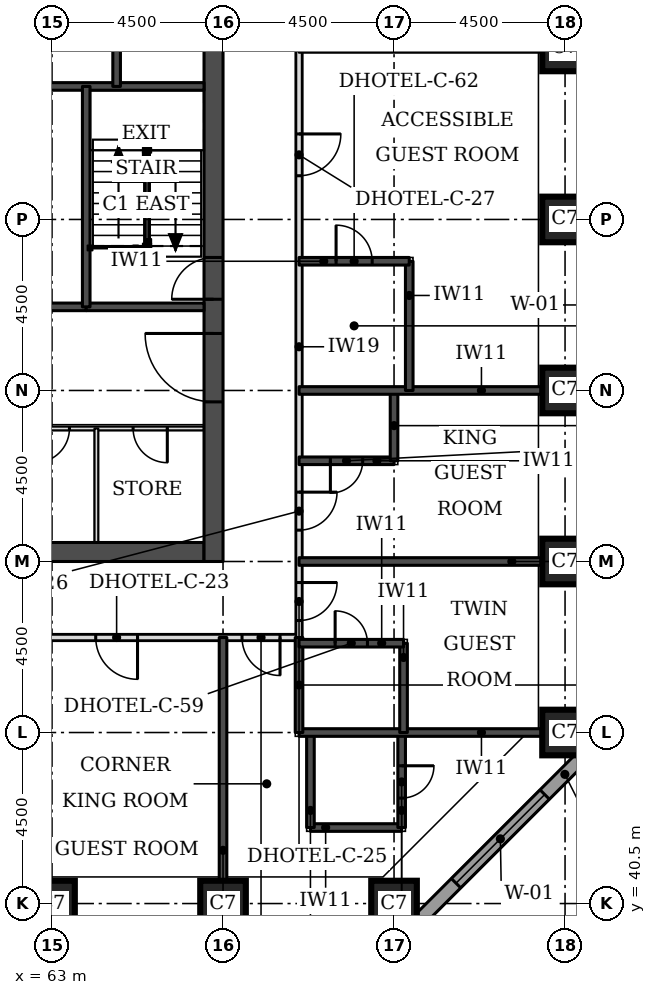
"""IFC4 building model, lengths in metres.
Left out: names, types, materials, properties, quantities, classifications, styles, units other than length and angle.
Written with IfcOpenShell. Run it as: python <this file> out.ifc"""

import sys

from ifc_helpers import new_model, si_unit, direction, frame, frame_2d, origin, origin_2d, place, context, subcontext, project, spatial, rectangle, extrude, element, fill, save


model = new_model("IFC4")
c1 = context("Model", 3, precision=1e-05, world=origin(), true_north=direction((0.0, 1.0)))
c2 = subcontext(c1, "Body", "Model", "MODEL_VIEW")
j1 = project(units=[si_unit("LENGTHUNIT", "METRE"), si_unit("PLANEANGLEUNIT", "RADIAN")], contexts=[c1])
p1 = place(None, origin())
s1 = spatial("IfcSite", under=j1, at=p1, CompositionType="ELEMENT")
p2 = place(p1, origin())
s2 = spatial("IfcBuilding", under=s1, at=p2, CompositionType="ELEMENT")
p3 = place(p2, frame((0.0, 0.0, 56.1)))
s3 = spatial("IfcBuildingStorey", under=s2, at=p3, CompositionType="ELEMENT", Elevation=56.1)
for number, where, z_axis, x_axis in (
    (1, (63.0, 40.5, 0.0), (0.0, 0.0, 1.0), (1.0, 0.0, 0.0)),
    (2, (67.5, 40.5, 0.0), (0.0, 0.0, 1.0), (1.0, 0.0, 0.0)),
    (3, (72.0, 40.5, 0.0), (0.0, 0.0, 1.0), (1.0, 0.0, 0.0)),
    (4, (76.5, 45.0, 0.0), (0.0, 0.0, 1.0), (1.0, 0.0, 0.0)),
    (5, (76.5, 49.5, 0.0), (0.0, 0.0, 1.0), (1.0, 0.0, 0.0)),
    (6, (76.5, 54.0, 0.0), (0.0, 0.0, 1.0), (1.0, 0.0, 0.0)),
    (7, (76.5, 58.5, 0.0), (0.0, 0.0, 1.0), (1.0, 0.0, 0.0)),
    (8, (76.5, 63.0, 0.0), (0.0, 0.0, 1.0), (1.0, 0.0, 0.0)),
):
    element("IfcColumn", number, at=place(p3, frame(where, z_axis=z_axis, x_axis=x_axis)), inside=s3, PredefinedType="COLUMN", context=c2, shape_type="SweptSolid", body=[
        extrude(rectangle(XDim=1.2, YDim=1.2, at=origin_2d()), origin(), (0.0, 0.0, 1.0), 3.3),
    ])
p4 = place(p3, frame((45.5, 49.75, 0.0), z_axis=(0.0, 0.0, 1.0), x_axis=(1.0, 0.0, 0.0)))
e9 = element("IfcWall", 9, at=p4, inside=s3, PredefinedType="SHEAR", context=c2, shape_type="SweptSolid", body=[
    extrude(rectangle(XDim=21.5, YDim=0.5, at=frame_2d((10.75, 0.0))), origin(), (0.0, 0.0, 1.0), 3.3),
])
p5 = place(p3, frame((67.25, 49.5, 0.0), z_axis=(0.0, 0.0, 1.0), x_axis=(0.0, 1.0, 0.0)))
e10 = element("IfcWall", 10, at=p5, inside=s3, PredefinedType="SHEAR", context=c2, shape_type="SweptSolid", body=[
    extrude(rectangle(XDim=22.5, YDim=0.5, at=frame_2d((11.25, 0.0))), origin(), (0.0, 0.0, 1.0), 3.3),
])
p6 = place(p5, frame((4.2, 0.0, 0.0)))
e11 = element("IfcOpeningElement", 11, at=p6, cuts=e10, PredefinedType="OPENING", context=c2, shape_type="SweptSolid", body=[
    extrude(rectangle(XDim=1.8, YDim=2.1, at=frame_2d((0.9, 1.05))), frame((0.0, 0.26, 0.0), z_axis=(0.0, -1.0, 0.0), x_axis=(1.0, 0.0, 0.0)), (0.0, 0.0, 1.0), 0.52),
])
p7 = place(p5, frame((6.9, 0.0, 0.0)))
e12 = element("IfcOpeningElement", 12, at=p7, cuts=e10, PredefinedType="OPENING", context=c2, shape_type="SweptSolid", body=[
    extrude(rectangle(XDim=1.1, YDim=2.1, at=frame_2d((0.55, 1.05))), frame((0.0, 0.26, 0.0), z_axis=(0.0, -1.0, 0.0), x_axis=(1.0, 0.0, 0.0)), (0.0, 0.0, 1.0), 0.52),
])
p8 = place(p5, frame((13.6, 0.0, 0.0)))
e13 = element("IfcOpeningElement", 13, at=p8, cuts=e10, PredefinedType="OPENING", context=c2, shape_type="SweptSolid", body=[
    extrude(rectangle(XDim=1.1, YDim=2.1, at=frame_2d((0.55, 1.05))), frame((0.0, 0.26, 0.0), z_axis=(0.0, -1.0, 0.0), x_axis=(1.0, 0.0, 0.0)), (0.0, 0.0, 1.0), 0.52),
])
p9 = place(p5, frame((16.5, 0.0, 0.0)))
e14 = element("IfcOpeningElement", 14, at=p9, cuts=e10, PredefinedType="OPENING", context=c2, shape_type="SweptSolid", body=[
    extrude(rectangle(XDim=1.8, YDim=2.1, at=frame_2d((0.9, 1.05))), frame((0.0, 0.26, 0.0), z_axis=(0.0, -1.0, 0.0), x_axis=(1.0, 0.0, 0.0)), (0.0, 0.0, 1.0), 0.52),
])
p10 = place(p3, frame((72.27, 39.674, 0.0), z_axis=(0.0, 0.0, 1.0), x_axis=(0.707106781187, 0.707106781187, 0.0)))
e15 = element("IfcWall", 15, at=p10, inside=s3, PredefinedType="STANDARD", context=c2, shape_type="SweptSolid", body=[
    extrude(rectangle(XDim=7.151, YDim=0.35, at=frame_2d((3.576, 0.0))), origin(), (0.0, 0.0, 1.0), 3.055),
])
p11 = place(p10, frame((1.926, 0.0, 0.8)))
e16 = element("IfcOpeningElement", 16, at=p11, cuts=e15, PredefinedType="OPENING", context=c2, shape_type="SweptSolid", body=[
    extrude(rectangle(XDim=3.3, YDim=1.5, at=frame_2d((1.65, 0.75))), frame((0.0, 0.185, 0.0), z_axis=(0.0, -1.0, 0.0), x_axis=(1.0, 0.0, 0.0)), (0.0, 0.0, 1.0), 0.37),
])
p12 = place(p3, frame((52.85, 47.5, 0.0), z_axis=(0.0, 0.0, 1.0), x_axis=(1.0, 0.0, 0.0)))
e17 = element("IfcWall", 17, at=p12, inside=s3, PredefinedType="PARTITIONING", context=c2, shape_type="SweptSolid", body=[
    extrude(rectangle(XDim=16.65, YDim=0.15, at=frame_2d((8.325, 0.0))), origin(), (0.0, 0.0, 1.0), 3.08),
])
p13 = place(p12, frame((11.3, 0.0, 0.0)))
e18 = element("IfcOpeningElement", 18, at=p13, cuts=e17, PredefinedType="OPENING", context=c2, shape_type="SweptSolid", body=[
    extrude(rectangle(XDim=1.1, YDim=2.1, at=frame_2d((0.55, 1.05))), frame((0.0, 0.085, 0.0), z_axis=(0.0, -1.0, 0.0), x_axis=(1.0, 0.0, 0.0)), (0.0, 0.0, 1.0), 0.17),
])
p14 = place(p12, frame((15.15, 0.0, 0.0)))
e19 = element("IfcOpeningElement", 19, at=p14, cuts=e17, PredefinedType="OPENING", context=c2, shape_type="SweptSolid", body=[
    extrude(rectangle(XDim=1.0, YDim=2.1, at=frame_2d((0.5, 1.05))), frame((0.0, 0.085, 0.0), z_axis=(0.0, -1.0, 0.0), x_axis=(1.0, 0.0, 0.0)), (0.0, 0.0, 1.0), 0.17),
])
p15 = place(p3, frame((69.5, 47.5, 0.0), z_axis=(0.0, 0.0, 1.0), x_axis=(0.0, 1.0, 0.0)))
e20 = element("IfcWall", 20, at=p15, inside=s3, PredefinedType="PARTITIONING", context=c2, shape_type="SweptSolid", body=[
    extrude(rectangle(XDim=26.5, YDim=0.15, at=frame_2d((13.25, 0.0))), origin(), (0.0, 0.0, 1.0), 3.08),
])
p16 = place(p15, frame((25.053, 0.0, 0.0)))
e21 = element("IfcOpeningElement", 21, at=p16, cuts=e20, PredefinedType="OPENING", context=c2, shape_type="SweptSolid", body=[
    extrude(rectangle(XDim=1.0, YDim=2.1, at=frame_2d((0.5, 1.05))), frame((0.0, 0.085, 0.0), z_axis=(0.0, -1.0, 0.0), x_axis=(1.0, 0.0, 0.0)), (0.0, 0.0, 1.0), 0.17),
])
p17 = place(p15, frame((18.275, 0.0, 0.0)))
e22 = element("IfcOpeningElement", 22, at=p17, cuts=e20, PredefinedType="OPENING", context=c2, shape_type="SweptSolid", body=[
    extrude(rectangle(XDim=1.0, YDim=2.1, at=frame_2d((0.5, 1.05))), frame((0.0, 0.085, 0.0), z_axis=(0.0, -1.0, 0.0), x_axis=(1.0, 0.0, 0.0)), (0.0, 0.0, 1.0), 0.17),
])
p18 = place(p15, frame((12.15, 0.0, 0.0)))
e23 = element("IfcOpeningElement", 23, at=p18, cuts=e20, PredefinedType="OPENING", context=c2, shape_type="SweptSolid", body=[
    extrude(rectangle(XDim=1.1, YDim=2.1, at=frame_2d((0.55, 1.05))), frame((0.0, 0.085, 0.0), z_axis=(0.0, -1.0, 0.0), x_axis=(1.0, 0.0, 0.0)), (0.0, 0.0, 1.0), 0.17),
])
p19 = place(p15, frame((2.825, 0.0, 0.0)))
e24 = element("IfcOpeningElement", 24, at=p19, cuts=e20, PredefinedType="OPENING", context=c2, shape_type="SweptSolid", body=[
    extrude(rectangle(XDim=1.0, YDim=2.1, at=frame_2d((0.5, 1.05))), frame((0.0, 0.085, 0.0), z_axis=(0.0, -1.0, 0.0), x_axis=(1.0, 0.0, 0.0)), (0.0, 0.0, 1.0), 0.17),
])
p20 = place(p15, frame((0.447, 0.0, 0.0)))
e25 = element("IfcOpeningElement", 25, at=p20, cuts=e20, PredefinedType="OPENING", context=c2, shape_type="SweptSolid", body=[
    extrude(rectangle(XDim=1.0, YDim=2.1, at=frame_2d((0.5, 1.05))), frame((0.0, 0.085, 0.0), z_axis=(0.0, -1.0, 0.0), x_axis=(1.0, 0.0, 0.0)), (0.0, 0.0, 1.0), 0.17),
])
p21 = place(p3, frame((67.5, 41.1, 0.0), z_axis=(0.0, 0.0, 1.0), x_axis=(0.0, 1.0, 0.0)))
e26 = element("IfcWall", 26, at=p21, inside=s3, PredefinedType="SOLIDWALL", context=c2, shape_type="SweptSolid", body=[
    extrude(rectangle(XDim=6.4, YDim=0.2, at=frame_2d((3.2, 0.0))), origin(), (0.0, 0.0, 1.0), 3.08),
])
p22 = place(p3, frame((69.8, 42.5, 0.0), z_axis=(0.0, 0.0, 1.0), x_axis=(1.0, 0.0, 0.0)))
e27 = element("IfcWall", 27, at=p22, inside=s3, PredefinedType="SOLIDWALL", context=c2, shape_type="SweptSolid", body=[
    extrude(rectangle(XDim=2.4, YDim=0.2, at=frame_2d((1.2, 0.0))), origin(), (0.0, 0.0, 1.0), 3.08),
])
p23 = place(p3, frame((69.8, 42.5, 0.0), z_axis=(0.0, 0.0, 1.0), x_axis=(0.0, 1.0, 0.0)))
e28 = element("IfcWall", 28, at=p23, inside=s3, PredefinedType="SOLIDWALL", context=c2, shape_type="SweptSolid", body=[
    extrude(rectangle(XDim=2.5, YDim=0.2, at=frame_2d((1.25, 0.0))), origin(), (0.0, 0.0, 1.0), 3.08),
])
p24 = place(p3, frame((72.2, 42.5, 0.0), z_axis=(0.0, 0.0, 1.0), x_axis=(0.0, 1.0, 0.0)))
e29 = element("IfcWall", 29, at=p24, inside=s3, PredefinedType="SOLIDWALL", context=c2, shape_type="SweptSolid", body=[
    extrude(rectangle(XDim=2.5, YDim=0.2, at=frame_2d((1.25, 0.0))), origin(), (0.0, 0.0, 1.0), 3.08),
])
p25 = place(p24, frame((0.775, 0.0, 0.0)))
e30 = element("IfcOpeningElement", 30, at=p25, cuts=e29, PredefinedType="OPENING", context=c2, shape_type="SweptSolid", body=[
    extrude(rectangle(XDim=0.85, YDim=2.1, at=frame_2d((0.425, 1.05))), frame((0.0, 0.11, 0.0), z_axis=(0.0, -1.0, 0.0), x_axis=(1.0, 0.0, 0.0)), (0.0, 0.0, 1.0), 0.22),
])
p26 = place(p3, frame((69.5, 45.0, 0.0), z_axis=(0.0, 0.0, 1.0), x_axis=(1.0, 0.0, 0.0)))
e31 = element("IfcWall", 31, at=p26, inside=s3, PredefinedType="SOLIDWALL", context=c2, shape_type="SweptSolid", body=[
    extrude(rectangle(XDim=6.4, YDim=0.2, at=frame_2d((3.2, 0.0))), origin(), (0.0, 0.0, 1.0), 3.08),
])
p27 = place(p3, frame((69.5, 45.0, 0.0), z_axis=(0.0, 0.0, 1.0), x_axis=(0.0, 1.0, 0.0)))
e32 = element("IfcWall", 32, at=p27, inside=s3, PredefinedType="SOLIDWALL", context=c2, shape_type="SweptSolid", body=[
    extrude(rectangle(XDim=2.5, YDim=0.2, at=frame_2d((1.25, 0.0))), origin(), (0.0, 0.0, 1.0), 3.08),
])
p28 = place(p3, frame((72.25, 45.0, 0.0), z_axis=(0.0, 0.0, 1.0), x_axis=(0.0, 1.0, 0.0)))
e33 = element("IfcWall", 33, at=p28, inside=s3, PredefinedType="SOLIDWALL", context=c2, shape_type="SweptSolid", body=[
    extrude(rectangle(XDim=2.35, YDim=0.2, at=frame_2d((1.175, 0.0))), origin(), (0.0, 0.0, 1.0), 3.08),
])
p29 = place(p3, frame((69.5, 47.35, 0.0), z_axis=(0.0, 0.0, 1.0), x_axis=(1.0, 0.0, 0.0)))
e34 = element("IfcWall", 34, at=p29, inside=s3, PredefinedType="SOLIDWALL", context=c2, shape_type="SweptSolid", body=[
    extrude(rectangle(XDim=2.75, YDim=0.2, at=frame_2d((1.375, 0.0))), origin(), (0.0, 0.0, 1.0), 3.08),
])
p30 = place(p29, frame((0.95, 0.0, 0.0)))
e35 = element("IfcOpeningElement", 35, at=p30, cuts=e34, PredefinedType="OPENING", context=c2, shape_type="SweptSolid", body=[
    extrude(rectangle(XDim=0.85, YDim=2.1, at=frame_2d((0.425, 1.05))), frame((0.0, 0.11, 0.0), z_axis=(0.0, -1.0, 0.0), x_axis=(1.0, 0.0, 0.0)), (0.0, 0.0, 1.0), 0.22),
])
p31 = place(p3, frame((69.5, 49.5, 0.0), z_axis=(0.0, 0.0, 1.0), x_axis=(1.0, 0.0, 0.0)))
e36 = element("IfcWall", 36, at=p31, inside=s3, PredefinedType="SOLIDWALL", context=c2, shape_type="SweptSolid", body=[
    extrude(rectangle(XDim=6.4, YDim=0.2, at=frame_2d((3.2, 0.0))), origin(), (0.0, 0.0, 1.0), 3.08),
])
p32 = place(p3, frame((69.5, 52.15, 0.0), z_axis=(0.0, 0.0, 1.0), x_axis=(1.0, 0.0, 0.0)))
e37 = element("IfcWall", 37, at=p32, inside=s3, PredefinedType="SOLIDWALL", context=c2, shape_type="SweptSolid", body=[
    extrude(rectangle(XDim=2.5, YDim=0.2, at=frame_2d((1.25, 0.0))), origin(), (0.0, 0.0, 1.0), 3.08),
])
p33 = place(p32, frame((0.825, 0.0, 0.0)))
e38 = element("IfcOpeningElement", 38, at=p33, cuts=e37, PredefinedType="OPENING", context=c2, shape_type="SweptSolid", body=[
    extrude(rectangle(XDim=0.85, YDim=2.1, at=frame_2d((0.425, 1.05))), frame((0.0, 0.11, 0.0), z_axis=(0.0, -1.0, 0.0), x_axis=(1.0, 0.0, 0.0)), (0.0, 0.0, 1.0), 0.22),
])
p34 = place(p3, frame((72.0, 52.15, 0.0), z_axis=(0.0, 0.0, 1.0), x_axis=(0.0, 1.0, 0.0)))
e39 = element("IfcWall", 39, at=p34, inside=s3, PredefinedType="SOLIDWALL", context=c2, shape_type="SweptSolid", body=[
    extrude(rectangle(XDim=1.85, YDim=0.2, at=frame_2d((0.925, 0.0))), origin(), (0.0, 0.0, 1.0), 3.08),
])
p35 = place(p3, frame((69.5, 54.0, 0.0), z_axis=(0.0, 0.0, 1.0), x_axis=(1.0, 0.0, 0.0)))
e40 = element("IfcWall", 40, at=p35, inside=s3, PredefinedType="SOLIDWALL", context=c2, shape_type="SweptSolid", body=[
    extrude(rectangle(XDim=6.4, YDim=0.2, at=frame_2d((3.2, 0.0))), origin(), (0.0, 0.0, 1.0), 3.08),
])
p36 = place(p3, frame((72.4, 54.0, 0.0), z_axis=(0.0, 0.0, 1.0), x_axis=(0.0, 1.0, 0.0)))
e41 = element("IfcWall", 41, at=p36, inside=s3, PredefinedType="SOLIDWALL", context=c2, shape_type="SweptSolid", body=[
    extrude(rectangle(XDim=3.4, YDim=0.2, at=frame_2d((1.7, 0.0))), origin(), (0.0, 0.0, 1.0), 3.08),
])
p37 = place(p3, frame((69.5, 57.4, 0.0), z_axis=(0.0, 0.0, 1.0), x_axis=(1.0, 0.0, 0.0)))
e42 = element("IfcWall", 42, at=p37, inside=s3, PredefinedType="SOLIDWALL", context=c2, shape_type="SweptSolid", body=[
    extrude(rectangle(XDim=2.9, YDim=0.2, at=frame_2d((1.45, 0.0))), origin(), (0.0, 0.0, 1.0), 3.08),
])
p38 = place(p37, frame((0.975, 0.0, 0.0)))
e43 = element("IfcOpeningElement", 43, at=p38, cuts=e42, PredefinedType="OPENING", context=c2, shape_type="SweptSolid", body=[
    extrude(rectangle(XDim=0.95, YDim=2.1, at=frame_2d((0.475, 1.05))), frame((0.0, 0.11, 0.0), z_axis=(0.0, -1.0, 0.0), x_axis=(1.0, 0.0, 0.0)), (0.0, 0.0, 1.0), 0.22),
])
p39 = place(p3, frame((61.85, 53.0, 0.0), z_axis=(0.0, 0.0, 1.0), x_axis=(1.0, 0.0, 0.0)))
e44 = element("IfcWall", 44, at=p39, inside=s3, PredefinedType="PARTITIONING", context=c2, shape_type="SweptSolid", body=[
    extrude(rectangle(XDim=5.15, YDim=0.1, at=frame_2d((2.575, 0.0))), origin(), (0.0, 0.0, 1.0), 3.08),
])
p40 = place(p39, frame((3.284, 0.0, 0.0)))
e45 = element("IfcOpeningElement", 45, at=p40, cuts=e44, PredefinedType="OPENING", context=c2, shape_type="SweptSolid", body=[
    extrude(rectangle(XDim=0.9, YDim=2.1, at=frame_2d((0.45, 1.05))), frame((0.0, 0.06, 0.0), z_axis=(0.0, -1.0, 0.0), x_axis=(1.0, 0.0, 0.0)), (0.0, 0.0, 1.0), 0.12),
])
p41 = place(p39, frame((0.709, 0.0, 0.0)))
e46 = element("IfcOpeningElement", 46, at=p41, cuts=e44, PredefinedType="OPENING", context=c2, shape_type="SweptSolid", body=[
    extrude(rectangle(XDim=0.9, YDim=2.1, at=frame_2d((0.45, 1.05))), frame((0.0, 0.06, 0.0), z_axis=(0.0, -1.0, 0.0), x_axis=(1.0, 0.0, 0.0)), (0.0, 0.0, 1.0), 0.12),
])
p42 = place(p3, frame((61.85, 56.2, 0.0), z_axis=(0.0, 0.0, 1.0), x_axis=(1.0, 0.0, 0.0)))
e47 = element("IfcWall", 47, at=p42, inside=s3, PredefinedType="SOLIDWALL", context=c2, shape_type="SweptSolid", body=[
    extrude(rectangle(XDim=2.05, YDim=0.2, at=frame_2d((1.025, 0.0))), origin(), (0.0, 0.0, 1.0), 3.08),
])
p43 = place(p3, frame((63.9, 56.2, 0.0), z_axis=(0.0, 0.0, 1.0), x_axis=(1.0, 0.0, 0.0)))
e48 = element("IfcWall", 48, at=p43, inside=s3, PredefinedType="SOLIDWALL", context=c2, shape_type="SweptSolid", body=[
    extrude(rectangle(XDim=3.1, YDim=0.2, at=frame_2d((1.55, 0.0))), origin(), (0.0, 0.0, 1.0), 3.08),
])
p44 = place(p3, frame((61.85, 62.0, 0.0), z_axis=(0.0, 0.0, 1.0), x_axis=(1.0, 0.0, 0.0)))
e49 = element("IfcWall", 49, at=p44, inside=s3, PredefinedType="SOLIDWALL", context=c2, shape_type="SweptSolid", body=[
    extrude(rectangle(XDim=5.15, YDim=0.2, at=frame_2d((2.575, 0.0))), origin(), (0.0, 0.0, 1.0), 3.08),
])
p45 = place(p3, frame((63.9, 56.2, 0.0), z_axis=(0.0, 0.0, 1.0), x_axis=(0.0, 1.0, 0.0)))
e50 = element("IfcWall", 50, at=p45, inside=s3, PredefinedType="SOLIDWALL", context=c2, shape_type="SweptSolid", body=[
    extrude(rectangle(XDim=5.8, YDim=0.2, at=frame_2d((2.9, 0.0))), origin(), (0.0, 0.0, 1.0), 3.08),
])
p46 = place(p3, frame((64.167, 50.0, 0.0), z_axis=(0.0, 0.0, 1.0), x_axis=(0.0, 1.0, 0.0)))
e51 = element("IfcWall", 51, at=p46, inside=s3, PredefinedType="PARTITIONING", context=c2, shape_type="SweptSolid", body=[
    extrude(rectangle(XDim=3.0, YDim=0.1, at=frame_2d((1.5, 0.0))), origin(), (0.0, 0.0, 1.0), 3.08),
])
p47 = place(p3, frame((64.7, 62.0, 0.0), z_axis=(0.0, 0.0, 1.0), x_axis=(0.0, 1.0, 0.0)))
e52 = element("IfcWall", 52, at=p47, inside=s3, PredefinedType="SOLIDWALL", context=c2, shape_type="SweptSolid", body=[
    extrude(rectangle(XDim=3.3, YDim=0.2, at=frame_2d((1.65, 0.0))), origin(), (0.0, 0.0, 1.0), 3.08),
])
p48 = place(p47, frame((1.1, 0.0, 0.0)))
e53 = element("IfcOpeningElement", 53, at=p48, cuts=e52, PredefinedType="OPENING", context=c2, shape_type="SweptSolid", body=[
    extrude(rectangle(XDim=1.1, YDim=2.1, at=frame_2d((0.55, 1.05))), frame((0.0, 0.11, 0.0), z_axis=(0.0, -1.0, 0.0), x_axis=(1.0, 0.0, 0.0)), (0.0, 0.0, 1.0), 0.22),
])
p49 = place(p11, origin())
e54 = element("IfcWindow", 54, at=p49, inside=s3, PartitioningType="SINGLE_PANEL", PredefinedType="WINDOW", context=c2, shape_type="SweptSolid", body=[
    extrude(rectangle(XDim=3.3, YDim=1.5, at=frame_2d((1.65, 0.75))), frame((0.0, 0.085, 0.0), z_axis=(0.0, -1.0, 0.0), x_axis=(1.0, 0.0, 0.0)), (0.0, 0.0, 1.0), 0.06),
])
fill(e16, e54)
p50 = place(p18, frame((1.1, 0.0, 0.0), z_axis=(0.0, 0.0, 1.0), x_axis=(-1.0, 0.0, 0.0)))
e55 = element("IfcDoor", 55, at=p50, inside=s3, OperationType="SINGLE_SWING_LEFT", PredefinedType="DOOR", context=c2, shape_type="SweptSolid", body=[
    extrude(rectangle(XDim=1.1, YDim=2.1, at=frame_2d((0.55, 1.05))), frame((0.0, 0.025, 0.0), z_axis=(0.0, -1.0, 0.0), x_axis=(1.0, 0.0, 0.0)), (0.0, 0.0, 1.0), 0.05),
])
fill(e23, e55)
p51 = place(p38, origin())
e56 = element("IfcDoor", 56, at=p51, inside=s3, OperationType="SINGLE_SWING_LEFT", PredefinedType="DOOR", context=c2, shape_type="SweptSolid", body=[
    extrude(rectangle(XDim=0.95, YDim=2.1, at=frame_2d((0.475, 1.05))), frame((0.0, 0.025, 0.0), z_axis=(0.0, -1.0, 0.0), x_axis=(1.0, 0.0, 0.0)), (0.0, 0.0, 1.0), 0.05),
])
fill(e43, e56)
p52 = place(p19, frame((1.0, 0.0, 0.0), z_axis=(0.0, 0.0, 1.0), x_axis=(-1.0, 0.0, 0.0)))
e57 = element("IfcDoor", 57, at=p52, inside=s3, OperationType="SINGLE_SWING_LEFT", PredefinedType="DOOR", context=c2, shape_type="SweptSolid", body=[
    extrude(rectangle(XDim=1.0, YDim=2.1, at=frame_2d((0.5, 1.05))), frame((0.0, 0.025, 0.0), z_axis=(0.0, -1.0, 0.0), x_axis=(1.0, 0.0, 0.0)), (0.0, 0.0, 1.0), 0.05),
])
fill(e24, e57)
p53 = place(p33, frame((0.85, 0.0, 0.0), z_axis=(0.0, 0.0, 1.0), x_axis=(-1.0, 0.0, 0.0)))
e58 = element("IfcDoor", 58, at=p53, inside=s3, OperationType="SINGLE_SWING_RIGHT", PredefinedType="DOOR", context=c2, shape_type="SweptSolid", body=[
    extrude(rectangle(XDim=0.85, YDim=2.1, at=frame_2d((0.425, 1.05))), frame((0.0, 0.025, 0.0), z_axis=(0.0, -1.0, 0.0), x_axis=(1.0, 0.0, 0.0)), (0.0, 0.0, 1.0), 0.05),
])
fill(e38, e58)
p54 = place(p20, frame((1.0, 0.0, 0.0), z_axis=(0.0, 0.0, 1.0), x_axis=(-1.0, 0.0, 0.0)))
e59 = element("IfcDoor", 59, at=p54, inside=s3, OperationType="SINGLE_SWING_LEFT", PredefinedType="DOOR", context=c2, shape_type="SweptSolid", body=[
    extrude(rectangle(XDim=1.0, YDim=2.1, at=frame_2d((0.5, 1.05))), frame((0.0, 0.025, 0.0), z_axis=(0.0, -1.0, 0.0), x_axis=(1.0, 0.0, 0.0)), (0.0, 0.0, 1.0), 0.05),
])
fill(e25, e59)
p55 = place(p30, origin())
e60 = element("IfcDoor", 60, at=p55, inside=s3, OperationType="SINGLE_SWING_LEFT", PredefinedType="DOOR", context=c2, shape_type="SweptSolid", body=[
    extrude(rectangle(XDim=0.85, YDim=2.1, at=frame_2d((0.425, 1.05))), frame((0.0, 0.025, 0.0), z_axis=(0.0, -1.0, 0.0), x_axis=(1.0, 0.0, 0.0)), (0.0, 0.0, 1.0), 0.05),
])
fill(e35, e60)
p56 = place(p13, frame((1.1, 0.0, 0.0), z_axis=(0.0, 0.0, 1.0), x_axis=(-1.0, 0.0, 0.0)))
e61 = element("IfcDoor", 61, at=p56, inside=s3, OperationType="SINGLE_SWING_LEFT", PredefinedType="DOOR", context=c2, shape_type="SweptSolid", body=[
    extrude(rectangle(XDim=1.1, YDim=2.1, at=frame_2d((0.55, 1.05))), frame((0.0, 0.025, 0.0), z_axis=(0.0, -1.0, 0.0), x_axis=(1.0, 0.0, 0.0)), (0.0, 0.0, 1.0), 0.05),
])
fill(e18, e61)
p57 = place(p14, frame((1.0, 0.0, 0.0), z_axis=(0.0, 0.0, 1.0), x_axis=(-1.0, 0.0, 0.0)))
e62 = element("IfcDoor", 62, at=p57, inside=s3, OperationType="SINGLE_SWING_LEFT", PredefinedType="DOOR", context=c2, shape_type="SweptSolid", body=[
    extrude(rectangle(XDim=1.0, YDim=2.1, at=frame_2d((0.5, 1.05))), frame((0.0, 0.025, 0.0), z_axis=(0.0, -1.0, 0.0), x_axis=(1.0, 0.0, 0.0)), (0.0, 0.0, 1.0), 0.05),
])
fill(e19, e62)
p58 = place(p25, frame((0.85, 0.0, 0.0), z_axis=(0.0, 0.0, 1.0), x_axis=(-1.0, 0.0, 0.0)))
e63 = element("IfcDoor", 63, at=p58, inside=s3, OperationType="SINGLE_SWING_LEFT", PredefinedType="DOOR", context=c2, shape_type="SweptSolid", body=[
    extrude(rectangle(XDim=0.85, YDim=2.1, at=frame_2d((0.425, 1.05))), frame((0.0, 0.025, 0.0), z_axis=(0.0, -1.0, 0.0), x_axis=(1.0, 0.0, 0.0)), (0.0, 0.0, 1.0), 0.05),
])
fill(e30, e63)
p59 = place(p6, origin())
e64 = element("IfcDoor", 64, at=p59, inside=s3, OperationType="SINGLE_SWING_RIGHT", PredefinedType="DOOR", context=c2, shape_type="SweptSolid", body=[
    extrude(rectangle(XDim=1.8, YDim=2.1, at=frame_2d((0.9, 1.05))), frame((0.0, 0.025, 0.0), z_axis=(0.0, -1.0, 0.0), x_axis=(1.0, 0.0, 0.0)), (0.0, 0.0, 1.0), 0.05),
])
fill(e11, e64)
p60 = place(p7, origin())
e65 = element("IfcDoor", 65, at=p60, inside=s3, OperationType="SINGLE_SWING_LEFT", PredefinedType="DOOR", context=c2, shape_type="SweptSolid", body=[
    extrude(rectangle(XDim=1.1, YDim=2.1, at=frame_2d((0.55, 1.05))), frame((0.0, 0.025, 0.0), z_axis=(0.0, -1.0, 0.0), x_axis=(1.0, 0.0, 0.0)), (0.0, 0.0, 1.0), 0.05),
])
fill(e12, e65)
p61 = place(p40, frame((0.9, 0.0, 0.0), z_axis=(0.0, 0.0, 1.0), x_axis=(-1.0, 0.0, 0.0)))
e66 = element("IfcDoor", 66, at=p61, inside=s3, OperationType="SINGLE_SWING_LEFT", PredefinedType="DOOR", context=c2, shape_type="SweptSolid", body=[
    extrude(rectangle(XDim=0.9, YDim=2.1, at=frame_2d((0.45, 1.05))), frame((0.0, 0.025, 0.0), z_axis=(0.0, -1.0, 0.0), x_axis=(1.0, 0.0, 0.0)), (0.0, 0.0, 1.0), 0.05),
])
fill(e45, e66)
p62 = place(p41, frame((0.9, 0.0, 0.0), z_axis=(0.0, 0.0, 1.0), x_axis=(-1.0, 0.0, 0.0)))
e67 = element("IfcDoor", 67, at=p62, inside=s3, OperationType="SINGLE_SWING_RIGHT", PredefinedType="DOOR", context=c2, shape_type="SweptSolid", body=[
    extrude(rectangle(XDim=0.9, YDim=2.1, at=frame_2d((0.45, 1.05))), frame((0.0, 0.025, 0.0), z_axis=(0.0, -1.0, 0.0), x_axis=(1.0, 0.0, 0.0)), (0.0, 0.0, 1.0), 0.05),
])
fill(e46, e67)
save(model, sys.argv[1])
